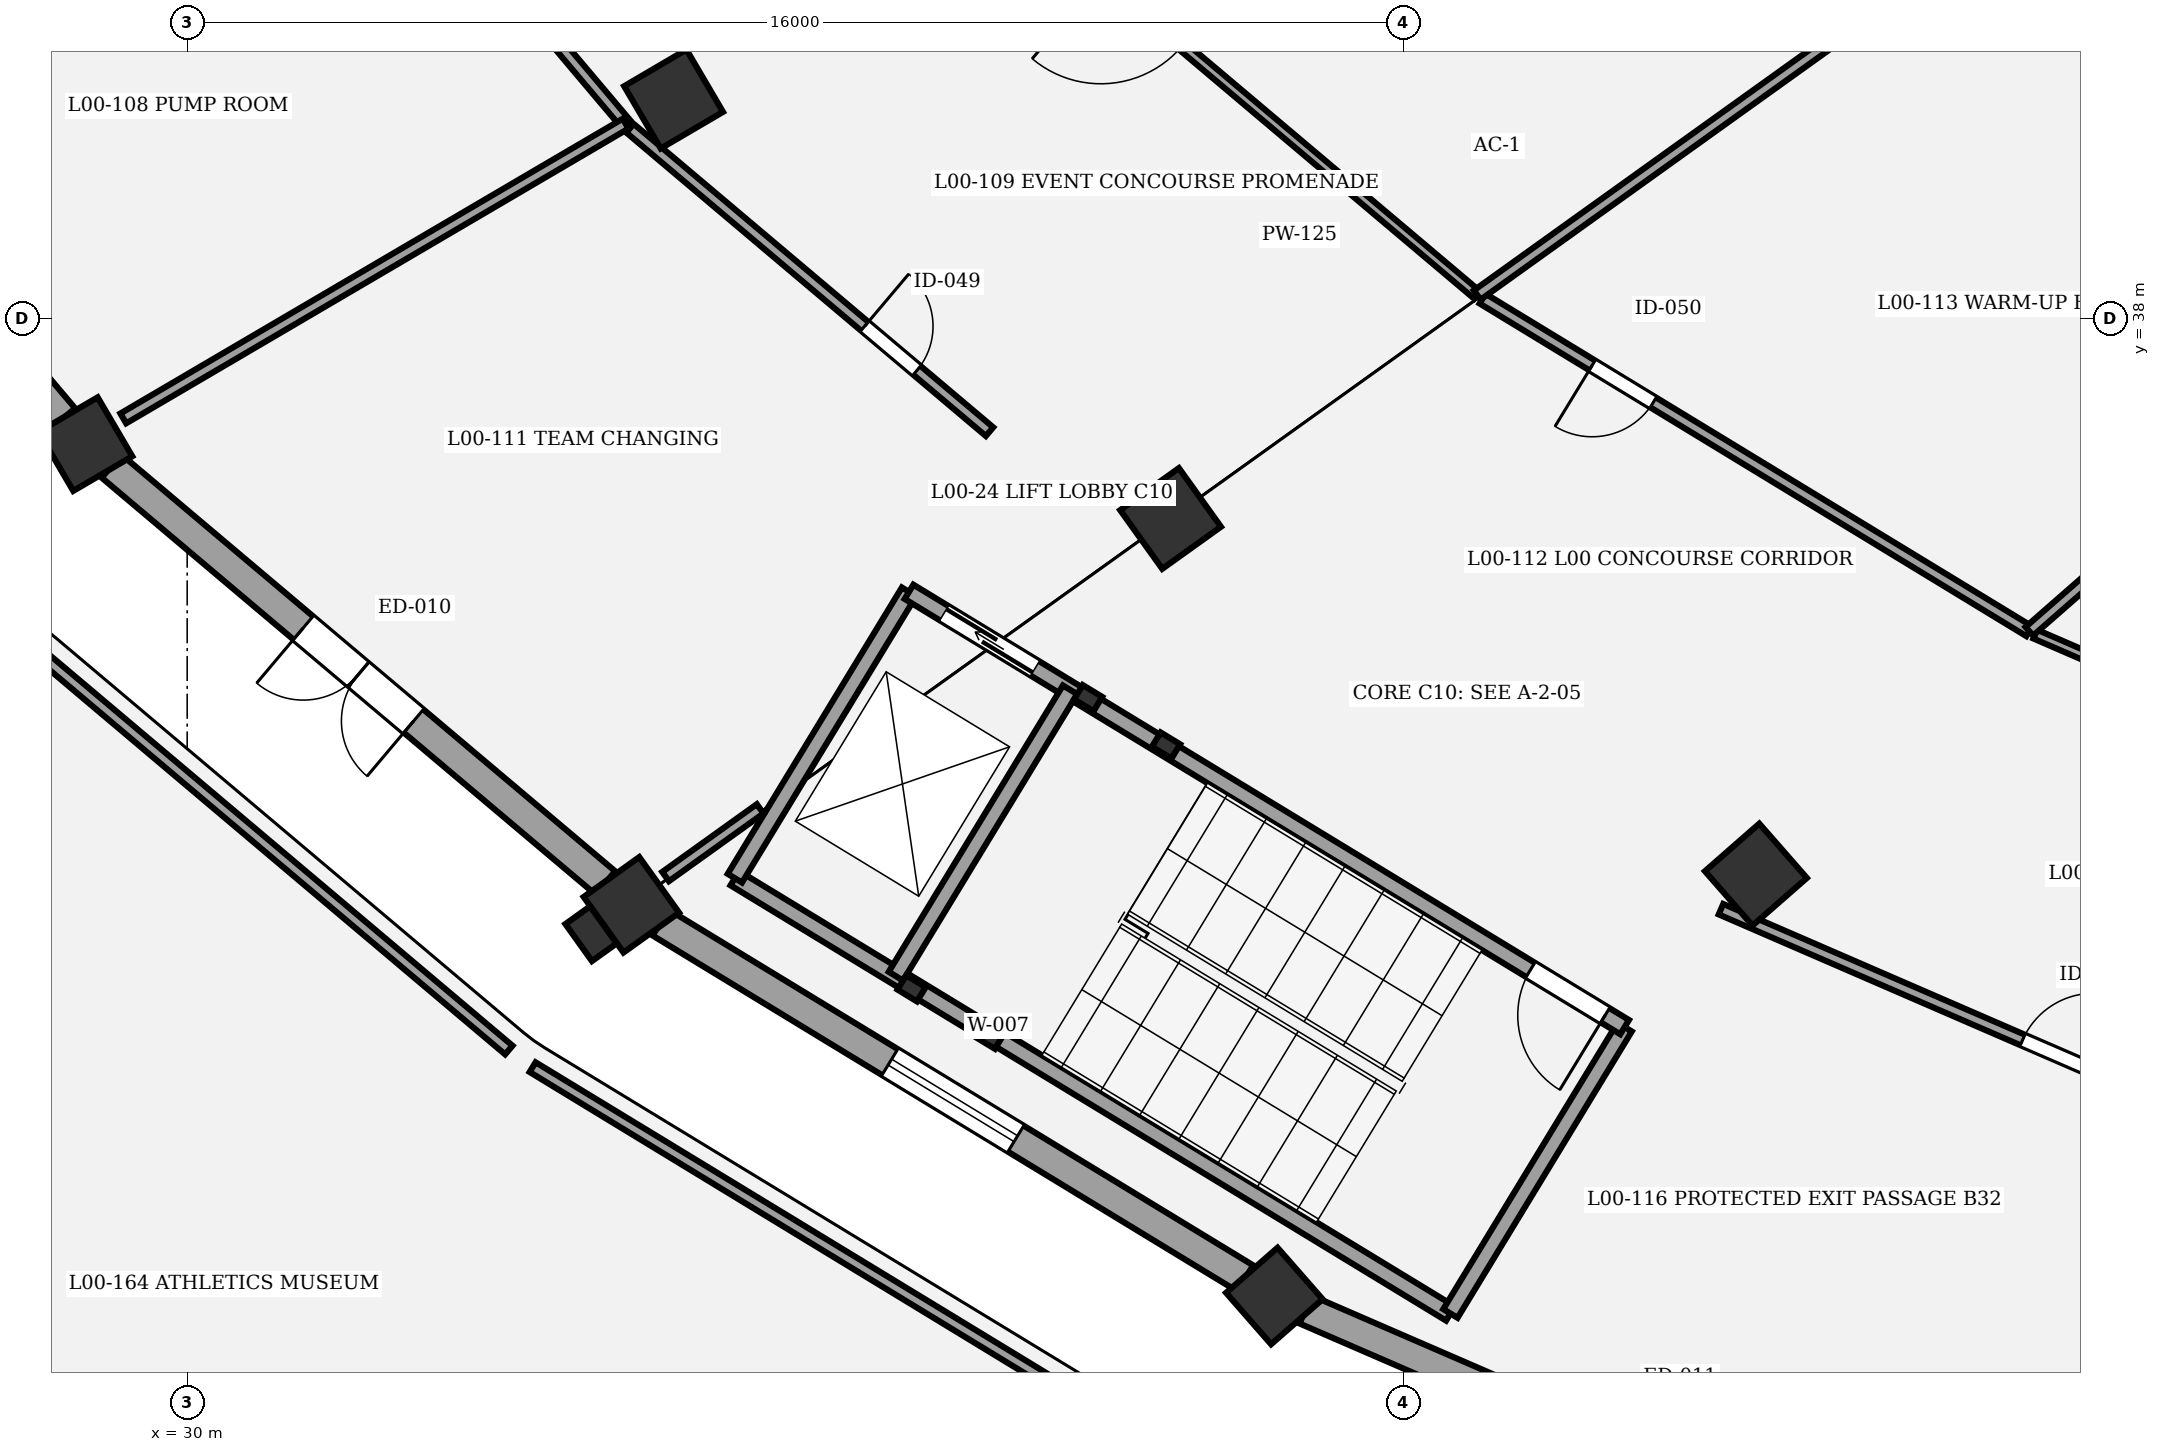
"""IFC4 building model, lengths in metres.
Left out: names, types, materials, properties, quantities, classifications, styles, units other than length and angle.
Written with IfcOpenShell. Run it as: python <this file> out.ifc"""

import sys

from ifc_helpers import new_model, si_unit, direction, frame, frame_2d, origin, origin_2d, place, context, subcontext, project, spatial, rectangle, extrude, element, fill, save


model = new_model("IFC4")
c1 = context("Model", 3, precision=1e-05, world=origin(), true_north=direction((0.0, 1.0)))
c2 = subcontext(c1, "Body", "Model", "MODEL_VIEW")
j1 = project(units=[si_unit("LENGTHUNIT", "METRE"), si_unit("PLANEANGLEUNIT", "RADIAN")], contexts=[c1])
p1 = place(None, origin())
s1 = spatial("IfcSite", under=j1, at=p1, CompositionType="ELEMENT")
p2 = place(p1, origin())
s2 = spatial("IfcBuilding", under=s1, at=p2, CompositionType="ELEMENT")
p3 = place(p2, origin())
s3 = spatial("IfcBuildingStorey", under=s2, at=p3, CompositionType="ELEMENT", Elevation=0.0)
p4 = place(p3, frame((36.4, 40.886, 0.0), z_axis=(0.0, 0.0, 1.0), x_axis=(-0.862513669207, -0.506033764121, 0.0)))
e1 = element("IfcColumn", 1, at=p4, inside=s3, PredefinedType="COLUMN", context=c2, shape_type="SweptSolid", body=[
    extrude(rectangle(XDim=0.95, YDim=0.95, at=origin_2d()), origin(), (0.0, 0.0, 1.0), 5.4),
])
p5 = place(p3, frame((28.662, 36.346, 0.0), z_axis=(0.0, 0.0, 1.0), x_axis=(-0.862513669207, -0.506033764121, 0.0)))
e2 = element("IfcColumn", 2, at=p5, inside=s3, PredefinedType="COLUMN", context=c2, shape_type="SweptSolid", body=[
    extrude(rectangle(XDim=0.9, YDim=0.9, at=origin_2d()), origin(), (0.0, 0.0, 1.0), 5.4),
])
p6 = place(p3, frame((42.939, 35.368, 0.0), z_axis=(0.0, 0.0, 1.0), x_axis=(-0.812897512265, -0.582406760395, 0.0)))
e3 = element("IfcColumn", 3, at=p6, inside=s3, PredefinedType="COLUMN", context=c2, shape_type="SweptSolid", body=[
    extrude(rectangle(XDim=0.95, YDim=0.95, at=origin_2d()), origin(), (0.0, 0.0, 1.0), 5.4),
])
p7 = place(p3, frame((35.844, 30.285, 0.0), z_axis=(0.0, 0.0, 1.0), x_axis=(-0.812897512265, -0.582406760395, 0.0)))
e4 = element("IfcColumn", 4, at=p7, inside=s3, PredefinedType="COLUMN", context=c2, shape_type="SweptSolid", body=[
    extrude(rectangle(XDim=0.9, YDim=0.9, at=origin_2d()), origin(), (0.0, 0.0, 1.0), 5.4),
])
p8 = place(p3, frame((35.314, 29.905, 0.0), z_axis=(0.0, 0.0, 1.0), x_axis=(0.582406760395, -0.812897512265, 0.0)))
e5 = element("IfcColumn", 5, at=p8, inside=s3, PredefinedType="PILASTER", context=c2, shape_type="SweptSolid", body=[
    extrude(rectangle(XDim=0.6, YDim=0.4, at=origin_2d()), origin(), (0.0, 0.0, 1.0), 5.4),
])
p9 = place(p3, frame((50.64, 30.683, 0.0), z_axis=(0.0, 0.0, 1.0), x_axis=(-0.752529860433, -0.658558128912, 0.0)))
e6 = element("IfcColumn", 6, at=p9, inside=s3, PredefinedType="COLUMN", context=c2, shape_type="SweptSolid", body=[
    extrude(rectangle(XDim=0.95, YDim=0.95, at=origin_2d()), origin(), (0.0, 0.0, 1.0), 5.4),
])
p10 = place(p3, frame((44.304, 25.139, 0.0), z_axis=(0.0, 0.0, 1.0), x_axis=(-0.752529860433, -0.658558128912, 0.0)))
e7 = element("IfcColumn", 7, at=p10, inside=s3, PredefinedType="COLUMN", context=c2, shape_type="SweptSolid", body=[
    extrude(rectangle(XDim=0.9, YDim=0.9, at=origin_2d()), origin(), (0.0, 0.0, 1.0), 5.4),
])
p11 = place(p3, frame((28.373, 36.689, 0.0), z_axis=(0.0, 0.0, 1.0), x_axis=(-0.645194244502, 0.764018577563, 0.0)))
e8 = element("IfcWall", 8, at=p11, inside=s3, PredefinedType="STANDARD", context=c2, shape_type="SweptSolid", body=[
    extrude(rectangle(XDim=8.256, YDim=0.4, at=frame_2d((4.128, 0.0))), origin(), (0.0, 0.0, 1.0), 4.25),
])
p12 = place(p11, frame((3.228, 0.0, 0.0)))
e9 = element("IfcOpeningElement", 9, at=p12, cuts=e8, PredefinedType="OPENING", context=c2, shape_type="SweptSolid", body=[
    extrude(rectangle(XDim=1.8, YDim=2.4, at=frame_2d((0.9, 1.2))), frame((0.0, 0.21, 0.0), z_axis=(0.0, -1.0, 0.0), x_axis=(1.0, 0.0, 0.0)), (0.0, 0.0, 1.0), 0.42),
])
p13 = place(p3, frame((35.502, 30.574, 0.0), z_axis=(0.0, 0.0, 1.0), x_axis=(-0.764254773348, 0.644914445035, 0.0)))
e10 = element("IfcWall", 10, at=p13, inside=s3, PredefinedType="STANDARD", context=c2, shape_type="SweptSolid", body=[
    extrude(rectangle(XDim=8.502, YDim=0.4, at=frame_2d((4.251, 0.0))), origin(), (0.0, 0.0, 1.0), 4.25),
])
p14 = place(p13, frame((3.301, 0.0, 0.0)))
e11 = element("IfcOpeningElement", 11, at=p14, cuts=e10, PredefinedType="OPENING", context=c2, shape_type="SweptSolid", body=[
    extrude(rectangle(XDim=1.9, YDim=2.4, at=frame_2d((0.95, 1.2))), frame((0.0, 0.21, 0.0), z_axis=(0.0, -1.0, 0.0), x_axis=(1.0, 0.0, 0.0)), (0.0, 0.0, 1.0), 0.42),
])
p15 = place(p3, frame((43.921, 25.372, 0.0), z_axis=(0.0, 0.0, 1.0), x_axis=(-0.854319454423, 0.519748275413, 0.0)))
e12 = element("IfcWall", 12, at=p15, inside=s3, PredefinedType="STANDARD", context=c2, shape_type="SweptSolid", body=[
    extrude(rectangle(XDim=9.006, YDim=0.4, at=frame_2d((4.503, 0.0))), origin(), (0.0, 0.0, 1.0), 4.25),
])
p16 = place(p15, frame((3.533, 0.0, 1.1)))
e13 = element("IfcOpeningElement", 13, at=p16, cuts=e12, PredefinedType="OPENING", context=c2, shape_type="SweptSolid", body=[
    extrude(rectangle(XDim=1.94, YDim=1.55, at=frame_2d((0.97, 0.775))), frame((0.0, 0.21, 0.0), z_axis=(0.0, -1.0, 0.0), x_axis=(1.0, 0.0, 0.0)), (0.0, 0.0, 1.0), 0.42),
])
p17 = place(p3, frame((53.651, 21.087, 0.0), z_axis=(0.0, 0.0, 1.0), x_axis=(-0.917498309763, 0.397739678159, 0.0)))
e14 = element("IfcWall", 14, at=p17, inside=s3, PredefinedType="STANDARD", context=c2, shape_type="SweptSolid", body=[
    extrude(rectangle(XDim=9.74, YDim=0.4, at=frame_2d((4.87, 0.0))), origin(), (0.0, 0.0, 1.0), 4.25),
])
p18 = place(p17, frame((3.87, 0.0, 0.0)))
e15 = element("IfcOpeningElement", 15, at=p18, cuts=e14, PredefinedType="OPENING", context=c2, shape_type="SweptSolid", body=[
    extrude(rectangle(XDim=2.0, YDim=2.4, at=frame_2d((1.0, 1.2))), frame((0.0, 0.21, 0.0), z_axis=(0.0, -1.0, 0.0), x_axis=(1.0, 0.0, 0.0)), (0.0, 0.0, 1.0), 0.42),
])
for number, where, z_axis, x_axis in (
    (16, (42.879, 32.382, 0.0), (0.0, 0.0, 1.0), (-0.854, 0.52, 0.0)),
    (17, (41.854, 33.005, 0.0), (0.0, 0.0, 1.0), (-0.854, 0.52, 0.0)),
    (18, (39.531, 29.186, 0.0), (0.0, 0.0, 1.0), (-0.854, 0.52, 0.0)),
    (19, (40.556, 28.562, 0.0), (0.0, 0.0, 1.0), (-0.854, 0.52, 0.0)),
):
    element("IfcColumn", number, at=place(p3, frame(where, z_axis=z_axis, x_axis=x_axis)), inside=s3, PredefinedType="COLUMN", context=c2, shape_type="SweptSolid", body=[
        extrude(rectangle(XDim=0.3, YDim=0.22, at=origin_2d()), origin(), (0.0, 0.0, 1.0), 5.4),
    ])
p19 = place(p3, frame((46.621, 24.909, 0.0), z_axis=(0.0, 0.0, 1.0), x_axis=(-0.854373055797, 0.519660159651, 0.0)))
e20 = element("IfcWall", 20, at=p19, inside=s3, PredefinedType="SHEAR", context=c2, shape_type="SweptSolid", body=[
    extrude(rectangle(XDim=11.02, YDim=0.22, at=frame_2d((5.51, 0.0))), origin(), (0.0, 0.0, 1.0), 5.15),
])
p20 = place(p3, frame((48.913, 28.677, 0.0), z_axis=(0.0, 0.0, 1.0), x_axis=(-0.519729151243, -0.854331088834, 0.0)))
e21 = element("IfcWall", 21, at=p20, inside=s3, PredefinedType="SHEAR", context=c2, shape_type="SweptSolid", body=[
    extrude(rectangle(XDim=4.41, YDim=0.22, at=frame_2d((2.205, 0.0))), origin(), (0.0, 0.0, 1.0), 5.15),
])
p21 = place(p3, frame((39.497, 34.403, 0.0), z_axis=(0.0, 0.0, 1.0), x_axis=(-0.519664162523, -0.854370621095, 0.0)))
e22 = element("IfcWall", 22, at=p21, inside=s3, PredefinedType="SHEAR", context=c2, shape_type="SweptSolid", body=[
    extrude(rectangle(XDim=4.41, YDim=0.22, at=frame_2d((2.205, 0.0))), origin(), (0.0, 0.0, 1.0), 5.15),
])
p22 = place(p3, frame((48.913, 28.677, 0.0), z_axis=(0.0, 0.0, 1.0), x_axis=(-0.854369202373, 0.51966649501, 0.0)))
e23 = element("IfcWall", 23, at=p22, inside=s3, PredefinedType="SHEAR", context=c2, shape_type="SweptSolid", body=[
    extrude(rectangle(XDim=11.02, YDim=0.22, at=frame_2d((5.51, 0.0))), origin(), (0.0, 0.0, 1.0), 5.15),
])
p23 = place(p22, frame((0.3, 0.0, 0.0)))
e24 = element("IfcOpeningElement", 24, at=p23, cuts=e23, PredefinedType="OPENING", context=c2, shape_type="SweptSolid", body=[
    extrude(rectangle(XDim=1.15, YDim=2.15, at=frame_2d((0.575, 1.075))), frame((0.0, 0.12, 0.0), z_axis=(0.0, -1.0, 0.0), x_axis=(1.0, 0.0, 0.0)), (0.0, 0.0, 1.0), 0.24),
])
p24 = place(p22, frame((9.08, 0.0, 0.0)))
e25 = element("IfcOpeningElement", 25, at=p24, cuts=e23, PredefinedType="OPENING", context=c2, shape_type="SweptSolid", body=[
    extrude(rectangle(XDim=1.4, YDim=2.25, at=frame_2d((0.7, 1.125))), frame((0.0, 0.12, 0.0), z_axis=(0.0, -1.0, 0.0), x_axis=(1.0, 0.0, 0.0)), (0.0, 0.0, 1.0), 0.24),
])
p25 = place(p3, frame((41.616, 33.115, 0.0), z_axis=(0.0, 0.0, 1.0), x_axis=(-0.519664162523, -0.854370621095, 0.0)))
e26 = element("IfcWall", 26, at=p25, inside=s3, PredefinedType="SHEAR", context=c2, shape_type="SweptSolid", body=[
    extrude(rectangle(XDim=4.41, YDim=0.22, at=frame_2d((2.205, 0.0))), origin(), (0.0, 0.0, 1.0), 5.15),
])
p26 = place(p3, frame((30.405, 46.914, 0.0), z_axis=(0.0, 0.0, 1.0), x_axis=(0.64516519871, -0.76404310505, 0.0)))
e27 = element("IfcWall", 27, at=p26, inside=s3, PredefinedType="PARTITIONING", context=c2, shape_type="SweptSolid", body=[
    extrude(rectangle(XDim=8.313, YDim=0.15, at=frame_2d((4.157, 0.0))), origin(), (0.0, 0.0, 1.0), 4.15),
])
p27 = place(p26, frame((3.497, 0.0, 0.0)))
e28 = element("IfcOpeningElement", 28, at=p27, cuts=e27, PredefinedType="OPENING", context=c2, shape_type="SweptSolid", body=[
    extrude(rectangle(XDim=1.32, YDim=2.1, at=frame_2d((0.66, 1.05))), frame((0.0, 0.085, 0.0), z_axis=(0.0, -1.0, 0.0), x_axis=(1.0, 0.0, 0.0)), (0.0, 0.0, 1.0), 0.17),
])
p28 = place(p3, frame((46.973, 38.308, 0.0), z_axis=(0.0, 0.0, 1.0), x_axis=(-0.764249122867, 0.644921141068, 0.0)))
e29 = element("IfcWall", 29, at=p28, inside=s3, PredefinedType="PARTITIONING", context=c2, shape_type="SweptSolid", body=[
    extrude(rectangle(XDim=7.99, YDim=0.125, at=frame_2d((3.995, 0.0))), origin(), (0.0, 0.0, 1.0), 4.15),
])
p29 = place(p28, frame((5.08, 0.0, 0.0)))
e30 = element("IfcOpeningElement", 30, at=p29, cuts=e29, PredefinedType="OPENING", context=c2, shape_type="SweptSolid", body=[
    extrude(rectangle(XDim=1.4, YDim=2.1, at=frame_2d((0.7, 1.05))), frame((0.0, 0.073, 0.0), z_axis=(0.0, -1.0, 0.0), x_axis=(1.0, 0.0, 0.0)), (0.0, 0.0, 1.0), 0.145),
])
p30 = place(p3, frame((35.825, 40.503, 0.0), z_axis=(0.0, 0.0, 1.0), x_axis=(0.764269616674, -0.644896854565, 0.0)))
e31 = element("IfcWall", 31, at=p30, inside=s3, PredefinedType="PARTITIONING", context=c2, shape_type="SweptSolid", body=[
    extrude(rectangle(XDim=6.191, YDim=0.15, at=frame_2d((3.095, 0.0))), origin(), (0.0, 0.0, 1.0), 4.15),
])
p31 = place(p30, frame((4.041, 0.0, 0.0)))
e32 = element("IfcOpeningElement", 32, at=p31, cuts=e31, PredefinedType="OPENING", context=c2, shape_type="SweptSolid", body=[
    extrude(rectangle(XDim=0.9, YDim=2.2, at=frame_2d((0.45, 1.1))), frame((0.0, 0.085, 0.0), z_axis=(0.0, -1.0, 0.0), x_axis=(1.0, 0.0, 0.0)), (0.0, 0.0, 1.0), 0.17),
])
p32 = place(p3, frame((54.237, 33.884, 0.0), z_axis=(0.0, 0.0, 1.0), x_axis=(-0.854330104408, 0.519730769439, 0.0)))
e33 = element("IfcWall", 33, at=p32, inside=s3, PredefinedType="PARTITIONING", context=c2, shape_type="SweptSolid", body=[
    extrude(rectangle(XDim=8.42, YDim=0.15, at=frame_2d((4.21, 0.0))), origin(), (0.0, 0.0, 1.0), 4.15),
])
p33 = place(p32, frame((5.792, 0.0, 0.0)))
e34 = element("IfcOpeningElement", 34, at=p33, cuts=e33, PredefinedType="OPENING", context=c2, shape_type="SweptSolid", body=[
    extrude(rectangle(XDim=0.94, YDim=2.2, at=frame_2d((0.47, 1.1))), frame((0.0, 0.085, 0.0), z_axis=(0.0, -1.0, 0.0), x_axis=(1.0, 0.0, 0.0)), (0.0, 0.0, 1.0), 0.17),
])
p34 = place(p3, frame((62.618, 30.247, 0.0), z_axis=(0.0, 0.0, 1.0), x_axis=(-0.917494590455, 0.397748257677, 0.0)))
e35 = element("IfcWall", 35, at=p34, inside=s3, PredefinedType="PARTITIONING", context=c2, shape_type="SweptSolid", body=[
    extrude(rectangle(XDim=9.049, YDim=0.125, at=frame_2d((4.525, 0.0))), origin(), (0.0, 0.0, 1.0), 4.15),
])
p35 = place(p34, frame((6.263, 0.0, 0.0)))
e36 = element("IfcOpeningElement", 36, at=p35, cuts=e35, PredefinedType="OPENING", context=c2, shape_type="SweptSolid", body=[
    extrude(rectangle(XDim=0.98, YDim=2.2, at=frame_2d((0.49, 1.1))), frame((0.0, 0.073, 0.0), z_axis=(0.0, -1.0, 0.0), x_axis=(1.0, 0.0, 0.0)), (0.0, 0.0, 1.0), 0.145),
])
p36 = place(p3, frame((50.18, 30.228, 0.0), z_axis=(0.0, 0.0, 1.0), x_axis=(0.917508957037, -0.39771511633, 0.0)))
e37 = element("IfcWall", 37, at=p36, inside=s3, PredefinedType="PARTITIONING", context=c2, shape_type="SweptSolid", body=[
    extrude(rectangle(XDim=9.671, YDim=0.15, at=frame_2d((4.836, 0.0))), origin(), (0.0, 0.0, 1.0), 4.15),
])
p37 = place(p36, frame((4.326, 0.0, 0.0)))
e38 = element("IfcOpeningElement", 38, at=p37, cuts=e37, PredefinedType="OPENING", context=c2, shape_type="SweptSolid", body=[
    extrude(rectangle(XDim=1.02, YDim=2.2, at=frame_2d((0.51, 1.1))), frame((0.0, 0.085, 0.0), z_axis=(0.0, -1.0, 0.0), x_axis=(1.0, 0.0, 0.0)), (0.0, 0.0, 1.0), 0.17),
])
p38 = place(p3, frame((35.768, 40.562, 0.0), z_axis=(0.0, 0.0, 1.0), x_axis=(-0.862520085009, -0.506022828492, 0.0)))
e39 = element("IfcWall", 39, at=p38, inside=s3, PredefinedType="PARTITIONING", context=c2, shape_type="SweptSolid", body=[
    extrude(rectangle(XDim=7.663, YDim=0.15, at=frame_2d((3.831, 0.0))), origin(), (0.0, 0.0, 1.0), 4.15),
])
p39 = place(p3, frame((59.302, 47.142, 0.0), z_axis=(0.0, 0.0, 1.0), x_axis=(-0.812883175227, -0.582426770876, 0.0)))
e40 = element("IfcWall", 40, at=p39, inside=s3, PredefinedType="PARTITIONING", context=c2, shape_type="SweptSolid", body=[
    extrude(rectangle(XDim=15.167, YDim=0.15, at=frame_2d((7.583, 0.0))), origin(), (0.0, 0.0, 1.0), 4.15),
])
p40 = place(p3, frame((37.538, 31.548, 0.0), z_axis=(0.0, 0.0, 1.0), x_axis=(-0.812848600764, -0.582475022844, 0.0)))
e41 = element("IfcWall", 41, at=p40, inside=s3, PredefinedType="PARTITIONING", context=c2, shape_type="SweptSolid", body=[
    extrude(rectangle(XDim=1.53, YDim=0.15, at=frame_2d((0.765, 0.0))), origin(), (0.0, 0.0, 1.0), 4.15),
])
p41 = place(p3, frame((65.245, 43.517, 0.0), z_axis=(0.0, 0.0, 1.0), x_axis=(-0.75255911769, -0.658524695346, 0.0)))
e42 = element("IfcWall", 42, at=p41, inside=s3, PredefinedType="PARTITIONING", context=c2, shape_type="SweptSolid", body=[
    extrude(rectangle(XDim=14.627, YDim=0.15, at=frame_2d((7.314, 0.0))), origin(), (0.0, 0.0, 1.0), 4.15),
])
p42 = place(p3, frame((59.054, 26.381, 0.0), z_axis=(0.0, 0.0, 1.0), x_axis=(-0.677844539823, -0.735205263741, 0.0)))
e43 = element("IfcWall", 43, at=p42, inside=s3, PredefinedType="PARTITIONING", context=c2, shape_type="SweptSolid", body=[
    extrude(rectangle(XDim=6.87, YDim=0.15, at=frame_2d((3.435, 0.0))), origin(), (0.0, 0.0, 1.0), 4.15),
])
p43 = place(p3, frame((27.049, 34.436, 0.0), z_axis=(0.0, 0.0, 1.0), x_axis=(0.76426547638, -0.644901761212, 0.0)))
e44 = element("IfcWall", 44, at=p43, inside=s3, PredefinedType="PARTITIONING", context=c2, shape_type="SweptSolid", body=[
    extrude(rectangle(XDim=9.398, YDim=0.15, at=frame_2d((4.699, 0.0))), origin(), (0.0, 0.0, 1.0), 4.15),
])
p44 = place(p3, frame((34.545, 28.15, 0.0), z_axis=(0.0, 0.0, 1.0), x_axis=(0.854333268174, -0.519725568826, 0.0)))
e45 = element("IfcWall", 45, at=p44, inside=s3, PredefinedType="PARTITIONING", context=c2, shape_type="SweptSolid", body=[
    extrude(rectangle(XDim=9.902, YDim=0.15, at=frame_2d((4.951, 0.0))), origin(), (0.0, 0.0, 1.0), 4.15),
])
p45 = place(p14, origin())
e46 = element("IfcDoor", 46, at=p45, inside=s3, OperationType="DOUBLE_DOOR_SINGLE_SWING", PredefinedType="DOOR", context=c2, shape_type="SweptSolid", body=[
    extrude(rectangle(XDim=1.9, YDim=2.4, at=frame_2d((0.95, 1.2))), frame((0.0, 0.025, 0.0), z_axis=(0.0, -1.0, 0.0), x_axis=(1.0, 0.0, 0.0)), (0.0, 0.0, 1.0), 0.05),
])
fill(e11, e46)
p46 = place(p16, origin())
e47 = element("IfcWindow", 47, at=p46, inside=s3, PartitioningType="SINGLE_PANEL", PredefinedType="WINDOW", context=c2, shape_type="SweptSolid", body=[
    extrude(rectangle(XDim=1.94, YDim=1.55, at=frame_2d((0.97, 0.775))), frame((0.0, 0.03, 0.0), z_axis=(0.0, -1.0, 0.0), x_axis=(1.0, 0.0, 0.0)), (0.0, 0.0, 1.0), 0.06),
])
fill(e13, e47)
p47 = place(p23, origin())
e48 = element("IfcDoor", 48, at=p47, inside=s3, OperationType="SINGLE_SWING_LEFT", PredefinedType="DOOR", context=c2, shape_type="SweptSolid", body=[
    extrude(rectangle(XDim=1.15, YDim=2.15, at=frame_2d((0.575, 1.075))), frame((0.0, 0.025, 0.0), z_axis=(0.0, -1.0, 0.0), x_axis=(1.0, 0.0, 0.0)), (0.0, 0.0, 1.0), 0.05),
])
fill(e24, e48)
p48 = place(p24, origin())
e49 = element("IfcDoor", 49, at=p48, inside=s3, OperationType="DOUBLE_DOOR_SLIDING", PredefinedType="DOOR", context=c2, shape_type="SweptSolid", body=[
    extrude(rectangle(XDim=1.4, YDim=2.25, at=frame_2d((0.7, 1.125))), frame((0.0, 0.025, 0.0), z_axis=(0.0, -1.0, 0.0), x_axis=(1.0, 0.0, 0.0)), (0.0, 0.0, 1.0), 0.05),
])
fill(e25, e49)
p49 = place(p31, origin())
e50 = element("IfcDoor", 50, at=p49, inside=s3, OperationType="SINGLE_SWING_LEFT", PredefinedType="DOOR", context=c2, shape_type="SweptSolid", body=[
    extrude(rectangle(XDim=0.9, YDim=2.2, at=frame_2d((0.45, 1.1))), frame((0.0, 0.025, 0.0), z_axis=(0.0, -1.0, 0.0), x_axis=(1.0, 0.0, 0.0)), (0.0, 0.0, 1.0), 0.05),
])
fill(e32, e50)
p50 = place(p33, origin())
e51 = element("IfcDoor", 51, at=p50, inside=s3, OperationType="SINGLE_SWING_RIGHT", PredefinedType="DOOR", context=c2, shape_type="SweptSolid", body=[
    extrude(rectangle(XDim=0.94, YDim=2.2, at=frame_2d((0.47, 1.1))), frame((0.0, 0.025, 0.0), z_axis=(0.0, -1.0, 0.0), x_axis=(1.0, 0.0, 0.0)), (0.0, 0.0, 1.0), 0.05),
])
fill(e34, e51)
p51 = place(p37, origin())
e52 = element("IfcDoor", 52, at=p51, inside=s3, OperationType="SINGLE_SWING_RIGHT", PredefinedType="DOOR", context=c2, shape_type="SweptSolid", body=[
    extrude(rectangle(XDim=1.02, YDim=2.2, at=frame_2d((0.51, 1.1))), frame((0.0, 0.025, 0.0), z_axis=(0.0, -1.0, 0.0), x_axis=(1.0, 0.0, 0.0)), (0.0, 0.0, 1.0), 0.05),
])
fill(e38, e52)
save(model, sys.argv[1])
